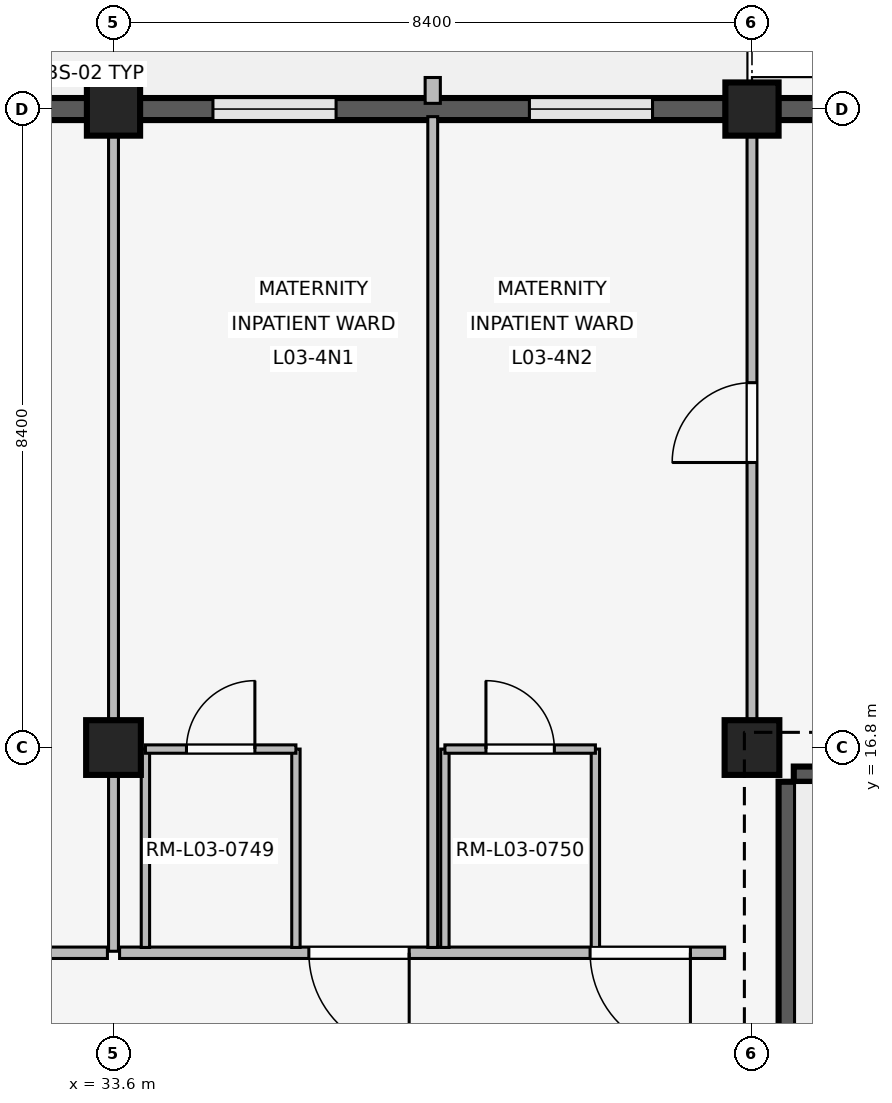
"""IFC4 building model, lengths in metres.
Left out: names, types, materials, properties, quantities, classifications, styles, units other than length and angle.
Written with IfcOpenShell. Run it as: python <this file> out.ifc"""

import sys

from ifc_helpers import new_model, si_unit, direction, frame, frame_2d, origin, origin_2d, place, context, subcontext, project, spatial, rectangle, extrude, element, fill, save


model = new_model("IFC4")
c1 = context("Model", 3, precision=1e-05, world=origin(), true_north=direction((0.0, 1.0)))
c2 = subcontext(c1, "Body", "Model", "MODEL_VIEW")
j1 = project(units=[si_unit("LENGTHUNIT", "METRE"), si_unit("PLANEANGLEUNIT", "RADIAN")], contexts=[c1])
p1 = place(None, origin())
s1 = spatial("IfcSite", under=j1, at=p1, CompositionType="ELEMENT")
p2 = place(p1, origin())
s2 = spatial("IfcBuilding", under=s1, at=p2, CompositionType="ELEMENT")
p3 = place(p2, frame((0.0, 0.0, 12.9)))
s3 = spatial("IfcBuildingStorey", under=s2, at=p3, CompositionType="ELEMENT", Elevation=12.9)
p4 = place(p3, frame((33.6, 16.8, 0.0), z_axis=(0.0, 0.0, 1.0), x_axis=(1.0, 0.0, 0.0)))
e1 = element("IfcColumn", 1, at=p4, inside=s3, PredefinedType="COLUMN", context=c2, shape_type="SweptSolid", body=[
    extrude(rectangle(XDim=0.72, YDim=0.72, at=origin_2d()), origin(), (0.0, 0.0, 1.0), 3.3),
])
p5 = place(p3, frame((33.6, 25.2, 0.0), z_axis=(0.0, 0.0, 1.0), x_axis=(1.0, 0.0, 0.0)))
e2 = element("IfcColumn", 2, at=p5, inside=s3, PredefinedType="COLUMN", context=c2, shape_type="SweptSolid", body=[
    extrude(rectangle(XDim=0.7, YDim=0.7, at=origin_2d()), origin(), (0.0, 0.0, 1.0), 3.3),
])
p6 = place(p3, frame((42.0, 16.8, 0.0), z_axis=(0.0, 0.0, 1.0), x_axis=(1.0, 0.0, 0.0)))
e3 = element("IfcColumn", 3, at=p6, inside=s3, PredefinedType="COLUMN", context=c2, shape_type="SweptSolid", body=[
    extrude(rectangle(XDim=0.72, YDim=0.72, at=origin_2d()), origin(), (0.0, 0.0, 1.0), 3.3),
])
p7 = place(p3, frame((42.0, 25.2, 0.0), z_axis=(0.0, 0.0, 1.0), x_axis=(1.0, 0.0, 0.0)))
e4 = element("IfcColumn", 4, at=p7, inside=s3, PredefinedType="COLUMN", context=c2, shape_type="SweptSolid", body=[
    extrude(rectangle(XDim=0.7, YDim=0.7, at=origin_2d()), origin(), (0.0, 0.0, 1.0), 3.3),
])
p8 = place(p3, frame((25.545, 25.2, 0.0), z_axis=(0.0, 0.0, 1.0), x_axis=(1.0, 0.0, 0.0)))
e5 = element("IfcWall", 5, at=p8, inside=s3, PredefinedType="SOLIDWALL", context=c2, shape_type="SweptSolid", body=[
    extrude(rectangle(XDim=7.71, YDim=0.29, at=frame_2d((3.855, 0.0))), origin(), (0.0, 0.0, 1.0), 2.44),
])
p9 = place(p8, frame((1.2, 0.0, 1.05)))
e6 = element("IfcOpeningElement", 6, at=p9, cuts=e5, PredefinedType="OPENING", context=c2, shape_type="SweptSolid", body=[
    extrude(rectangle(XDim=1.3, YDim=0.75, at=frame_2d((0.65, 0.375))), frame((0.0, 0.155, 0.0), z_axis=(0.0, -1.0, 0.0), x_axis=(1.0, 0.0, 0.0)), (0.0, 0.0, 1.0), 0.31),
])
p10 = place(p8, frame((5.21, 0.0, 1.05)))
e7 = element("IfcOpeningElement", 7, at=p10, cuts=e5, PredefinedType="OPENING", context=c2, shape_type="SweptSolid", body=[
    extrude(rectangle(XDim=1.3, YDim=0.75, at=frame_2d((0.65, 0.375))), frame((0.0, 0.155, 0.0), z_axis=(0.0, -1.0, 0.0), x_axis=(1.0, 0.0, 0.0)), (0.0, 0.0, 1.0), 0.31),
])
p11 = place(p3, frame((33.945, 25.2, 0.0), z_axis=(0.0, 0.0, 1.0), x_axis=(1.0, 0.0, 0.0)))
e8 = element("IfcWall", 8, at=p11, inside=s3, PredefinedType="SOLIDWALL", context=c2, shape_type="SweptSolid", body=[
    extrude(rectangle(XDim=7.71, YDim=0.29, at=frame_2d((3.855, 0.0))), origin(), (0.0, 0.0, 1.0), 2.44),
])
p12 = place(p11, frame((0.963, 0.0, 0.85)))
e9 = element("IfcOpeningElement", 9, at=p12, cuts=e8, PredefinedType="OPENING", context=c2, shape_type="SweptSolid", body=[
    extrude(rectangle(XDim=1.62, YDim=0.95, at=frame_2d((0.81, 0.475))), frame((0.0, 0.155, 0.0), z_axis=(0.0, -1.0, 0.0), x_axis=(1.0, 0.0, 0.0)), (0.0, 0.0, 1.0), 0.31),
])
p13 = place(p11, frame((5.127, 0.0, 0.85)))
e10 = element("IfcOpeningElement", 10, at=p13, cuts=e8, PredefinedType="OPENING", context=c2, shape_type="SweptSolid", body=[
    extrude(rectangle(XDim=1.62, YDim=0.95, at=frame_2d((0.81, 0.475))), frame((0.0, 0.155, 0.0), z_axis=(0.0, -1.0, 0.0), x_axis=(1.0, 0.0, 0.0)), (0.0, 0.0, 1.0), 0.31),
])
p14 = place(p3, frame((37.8, 25.275, 0.0), z_axis=(0.0, 0.0, 1.0), x_axis=(0.0, 1.0, 0.0)))
e11 = element("IfcWall", 11, at=p14, inside=s3, PredefinedType="ELEMENTEDWALL", context=c2, shape_type="SweptSolid", body=[
    extrude(rectangle(XDim=0.34, YDim=0.2, at=frame_2d((0.17, 0.0))), origin(), (0.0, 0.0, 1.0), 2.42),
])
p15 = place(p3, frame((42.345, 25.2, 0.0), z_axis=(0.0, 0.0, 1.0), x_axis=(1.0, 0.0, 0.0)))
e12 = element("IfcWall", 12, at=p15, inside=s3, PredefinedType="SOLIDWALL", context=c2, shape_type="SweptSolid", body=[
    extrude(rectangle(XDim=7.71, YDim=0.29, at=frame_2d((3.855, 0.0))), origin(), (0.0, 0.0, 1.0), 2.44),
])
p16 = place(p15, frame((1.043, 0.0, 0.85)))
e13 = element("IfcOpeningElement", 13, at=p16, cuts=e12, PredefinedType="OPENING", context=c2, shape_type="SweptSolid", body=[
    extrude(rectangle(XDim=1.46, YDim=0.85, at=frame_2d((0.73, 0.425))), frame((0.0, 0.155, 0.0), z_axis=(0.0, -1.0, 0.0), x_axis=(1.0, 0.0, 0.0)), (0.0, 0.0, 1.0), 0.31),
])
p17 = place(p15, frame((5.207, 0.0, 0.85)))
e14 = element("IfcOpeningElement", 14, at=p17, cuts=e12, PredefinedType="OPENING", context=c2, shape_type="SweptSolid", body=[
    extrude(rectangle(XDim=1.46, YDim=0.85, at=frame_2d((0.73, 0.425))), frame((0.0, 0.155, 0.0), z_axis=(0.0, -1.0, 0.0), x_axis=(1.0, 0.0, 0.0)), (0.0, 0.0, 1.0), 0.31),
])
p18 = place(p3, frame((42.55, 16.35, 0.0), z_axis=(0.0, 0.0, 1.0), x_axis=(1.0, 0.0, 0.0)))
e15 = element("IfcWall", 15, at=p18, inside=s3, PredefinedType="SHEAR", context=c2, shape_type="SweptSolid", body=[
    extrude(rectangle(XDim=7.5, YDim=0.4, at=frame_2d((3.75, 0.0))), origin(), (0.0, 0.0, 1.0), 3.02),
])
p19 = place(p3, frame((42.55, 8.8, 0.0), z_axis=(0.0, 0.0, 1.0), x_axis=(0.0, 1.0, 0.0)))
e16 = element("IfcWall", 16, at=p19, inside=s3, PredefinedType="SHEAR", context=c2, shape_type="SweptSolid", body=[
    extrude(rectangle(XDim=7.55, YDim=0.4, at=frame_2d((3.775, 0.0))), origin(), (0.0, 0.0, 1.0), 3.02),
])
p20 = place(p19, frame((0.28, 0.0, 0.0)))
e17 = element("IfcOpeningElement", 17, at=p20, cuts=e16, PredefinedType="OPENING", context=c2, shape_type="SweptSolid", body=[
    extrude(rectangle(XDim=1.0, YDim=2.15, at=frame_2d((0.5, 1.075))), frame((0.0, 0.21, 0.0), z_axis=(0.0, -1.0, 0.0), x_axis=(1.0, 0.0, 0.0)), (0.0, 0.0, 1.0), 0.42),
])
p21 = place(p3, frame((33.52, 14.1, 0.0), z_axis=(0.0, 0.0, 1.0), x_axis=(-1.0, 0.0, 0.0)))
e18 = element("IfcWall", 18, at=p21, inside=s3, PredefinedType="PARTITIONING", context=c2, shape_type="SweptSolid", body=[
    extrude(rectangle(XDim=8.24, YDim=0.15, at=frame_2d((4.12, 0.0))), origin(), (0.0, 0.0, 1.0), 2.42),
])
p22 = place(p21, frame((3.495, 0.0, 0.0)))
e19 = element("IfcOpeningElement", 19, at=p22, cuts=e18, PredefinedType="OPENING", context=c2, shape_type="SweptSolid", body=[
    extrude(rectangle(XDim=1.25, YDim=2.2, at=frame_2d((0.625, 1.1))), frame((0.0, 0.085, 0.0), z_axis=(0.0, -1.0, 0.0), x_axis=(1.0, 0.0, 0.0)), (0.0, 0.0, 1.0), 0.17),
])
p23 = place(p3, frame((33.6, 14.12, 0.0), z_axis=(0.0, 0.0, 1.0), x_axis=(0.0, 1.0, 0.0)))
e20 = element("IfcWall", 20, at=p23, inside=s3, PredefinedType="PARTITIONING", context=c2, shape_type="SweptSolid", body=[
    extrude(rectangle(XDim=10.94, YDim=0.13, at=frame_2d((5.47, 0.0))), origin(), (0.0, 0.0, 1.0), 2.42),
])
p24 = place(p3, frame((41.64, 14.1, 0.0), z_axis=(0.0, 0.0, 1.0), x_axis=(-1.0, 0.0, 0.0)))
e21 = element("IfcWall", 21, at=p24, inside=s3, PredefinedType="PARTITIONING", context=c2, shape_type="SweptSolid", body=[
    extrude(rectangle(XDim=7.96, YDim=0.15, at=frame_2d((3.98, 0.0))), origin(), (0.0, 0.0, 1.0), 2.42),
])
p25 = place(p24, frame((0.45, 0.0, 0.0)))
e22 = element("IfcOpeningElement", 22, at=p25, cuts=e21, PredefinedType="OPENING", context=c2, shape_type="SweptSolid", body=[
    extrude(rectangle(XDim=1.32, YDim=2.25, at=frame_2d((0.66, 1.125))), frame((0.0, 0.085, 0.0), z_axis=(0.0, -1.0, 0.0), x_axis=(1.0, 0.0, 0.0)), (0.0, 0.0, 1.0), 0.17),
])
p26 = place(p24, frame((4.15, 0.0, 0.0)))
e23 = element("IfcOpeningElement", 23, at=p26, cuts=e21, PredefinedType="OPENING", context=c2, shape_type="SweptSolid", body=[
    extrude(rectangle(XDim=1.32, YDim=2.25, at=frame_2d((0.66, 1.125))), frame((0.0, 0.085, 0.0), z_axis=(0.0, -1.0, 0.0), x_axis=(1.0, 0.0, 0.0)), (0.0, 0.0, 1.0), 0.17),
])
p27 = place(p3, frame((37.8, 14.17, 0.0), z_axis=(0.0, 0.0, 1.0), x_axis=(0.0, 1.0, 0.0)))
e24 = element("IfcWall", 24, at=p27, inside=s3, PredefinedType="PARTITIONING", context=c2, shape_type="SweptSolid", body=[
    extrude(rectangle(XDim=10.93, YDim=0.13, at=frame_2d((5.465, 0.0))), origin(), (0.0, 0.0, 1.0), 2.42),
])
for number, where, z_axis, x_axis in (
    (25, (34.02, 14.17, 0.0), (0.0, 0.0, 1.0), (0.0, 1.0, 0.0)),
    (26, (36.0, 14.17, 0.0), (0.0, 0.0, 1.0), (0.0, 1.0, 0.0)),
):
    element("IfcWall", number, at=place(p3, frame(where, z_axis=z_axis, x_axis=x_axis)), inside=s3, PredefinedType="PARTITIONING", context=c2, shape_type="SweptSolid", body=[
        extrude(rectangle(XDim=2.61, YDim=0.11, at=frame_2d((1.305, 0.0))), origin(), (0.0, 0.0, 1.0), 2.42),
    ])
p28 = place(p3, frame((34.02, 16.78, 0.0), z_axis=(0.0, 0.0, 1.0), x_axis=(1.0, 0.0, 0.0)))
e27 = element("IfcWall", 27, at=p28, inside=s3, PredefinedType="PARTITIONING", context=c2, shape_type="SweptSolid", body=[
    extrude(rectangle(XDim=1.98, YDim=0.11, at=frame_2d((0.99, 0.0))), origin(), (0.0, 0.0, 1.0), 2.42),
])
p29 = place(p28, frame((0.54, 0.0, 0.0)))
e28 = element("IfcOpeningElement", 28, at=p29, cuts=e27, PredefinedType="OPENING", context=c2, shape_type="SweptSolid", body=[
    extrude(rectangle(XDim=0.9, YDim=2.1, at=frame_2d((0.45, 1.05))), frame((0.0, 0.065, 0.0), z_axis=(0.0, -1.0, 0.0), x_axis=(1.0, 0.0, 0.0)), (0.0, 0.0, 1.0), 0.13),
])
for number, where, z_axis, x_axis in (
    (29, (37.96, 14.17, 0.0), (0.0, 0.0, 1.0), (0.0, 1.0, 0.0)),
    (30, (39.94, 14.17, 0.0), (0.0, 0.0, 1.0), (0.0, 1.0, 0.0)),
):
    element("IfcWall", number, at=place(p3, frame(where, z_axis=z_axis, x_axis=x_axis)), inside=s3, PredefinedType="PARTITIONING", context=c2, shape_type="SweptSolid", body=[
        extrude(rectangle(XDim=2.61, YDim=0.11, at=frame_2d((1.305, 0.0))), origin(), (0.0, 0.0, 1.0), 2.42),
    ])
p30 = place(p3, frame((37.96, 16.78, 0.0), z_axis=(0.0, 0.0, 1.0), x_axis=(1.0, 0.0, 0.0)))
e31 = element("IfcWall", 31, at=p30, inside=s3, PredefinedType="PARTITIONING", context=c2, shape_type="SweptSolid", body=[
    extrude(rectangle(XDim=1.98, YDim=0.11, at=frame_2d((0.99, 0.0))), origin(), (0.0, 0.0, 1.0), 2.42),
])
p31 = place(p30, frame((0.54, 0.0, 0.0)))
e32 = element("IfcOpeningElement", 32, at=p31, cuts=e31, PredefinedType="OPENING", context=c2, shape_type="SweptSolid", body=[
    extrude(rectangle(XDim=0.9, YDim=2.1, at=frame_2d((0.45, 1.05))), frame((0.0, 0.065, 0.0), z_axis=(0.0, -1.0, 0.0), x_axis=(1.0, 0.0, 0.0)), (0.0, 0.0, 1.0), 0.13),
])
p32 = place(p3, frame((42.0, 17.15, 0.0), z_axis=(0.0, 0.0, 1.0), x_axis=(0.0, 1.0, 0.0)))
e33 = element("IfcWall", 33, at=p32, inside=s3, PredefinedType="PARTITIONING", context=c2, shape_type="SweptSolid", body=[
    extrude(rectangle(XDim=7.91, YDim=0.13, at=frame_2d((3.955, 0.0))), origin(), (0.0, 0.0, 1.0), 2.42),
])
p33 = place(p32, frame((3.4, 0.0, 0.0)))
e34 = element("IfcOpeningElement", 34, at=p33, cuts=e33, PredefinedType="OPENING", context=c2, shape_type="SweptSolid", body=[
    extrude(rectangle(XDim=1.05, YDim=2.2, at=frame_2d((0.525, 1.1))), frame((0.0, 0.075, 0.0), z_axis=(0.0, -1.0, 0.0), x_axis=(1.0, 0.0, 0.0)), (0.0, 0.0, 1.0), 0.15),
])
p34 = place(p12, origin())
e35 = element("IfcWindow", 35, at=p34, inside=s3, PartitioningType="SINGLE_PANEL", PredefinedType="WINDOW", context=c2, shape_type="SweptSolid", body=[
    extrude(rectangle(XDim=1.62, YDim=0.95, at=frame_2d((0.81, 0.475))), frame((0.0, 0.03, 0.0), z_axis=(0.0, -1.0, 0.0), x_axis=(1.0, 0.0, 0.0)), (0.0, 0.0, 1.0), 0.06),
])
fill(e9, e35)
p35 = place(p13, origin())
e36 = element("IfcWindow", 36, at=p35, inside=s3, PartitioningType="SINGLE_PANEL", PredefinedType="WINDOW", context=c2, shape_type="SweptSolid", body=[
    extrude(rectangle(XDim=1.62, YDim=0.95, at=frame_2d((0.81, 0.475))), frame((0.0, 0.03, 0.0), z_axis=(0.0, -1.0, 0.0), x_axis=(1.0, 0.0, 0.0)), (0.0, 0.0, 1.0), 0.06),
])
fill(e10, e36)
p36 = place(p25, origin())
e37 = element("IfcDoor", 37, at=p36, inside=s3, OperationType="SINGLE_SWING_LEFT", PredefinedType="DOOR", context=c2, shape_type="SweptSolid", body=[
    extrude(rectangle(XDim=1.32, YDim=2.25, at=frame_2d((0.66, 1.125))), frame((0.0, 0.025, 0.0), z_axis=(0.0, -1.0, 0.0), x_axis=(1.0, 0.0, 0.0)), (0.0, 0.0, 1.0), 0.05),
])
fill(e22, e37)
p37 = place(p26, origin())
e38 = element("IfcDoor", 38, at=p37, inside=s3, OperationType="SINGLE_SWING_LEFT", PredefinedType="DOOR", context=c2, shape_type="SweptSolid", body=[
    extrude(rectangle(XDim=1.32, YDim=2.25, at=frame_2d((0.66, 1.125))), frame((0.0, 0.025, 0.0), z_axis=(0.0, -1.0, 0.0), x_axis=(1.0, 0.0, 0.0)), (0.0, 0.0, 1.0), 0.05),
])
fill(e23, e38)
p38 = place(p29, origin())
e39 = element("IfcDoor", 39, at=p38, inside=s3, OperationType="SINGLE_SWING_RIGHT", PredefinedType="DOOR", context=c2, shape_type="SweptSolid", body=[
    extrude(rectangle(XDim=0.9, YDim=2.1, at=frame_2d((0.45, 1.05))), frame((0.0, 0.025, 0.0), z_axis=(0.0, -1.0, 0.0), x_axis=(1.0, 0.0, 0.0)), (0.0, 0.0, 1.0), 0.05),
])
fill(e28, e39)
p39 = place(p31, origin())
e40 = element("IfcDoor", 40, at=p39, inside=s3, OperationType="SINGLE_SWING_LEFT", PredefinedType="DOOR", context=c2, shape_type="SweptSolid", body=[
    extrude(rectangle(XDim=0.9, YDim=2.1, at=frame_2d((0.45, 1.05))), frame((0.0, 0.025, 0.0), z_axis=(0.0, -1.0, 0.0), x_axis=(1.0, 0.0, 0.0)), (0.0, 0.0, 1.0), 0.05),
])
fill(e32, e40)
p40 = place(p33, origin())
e41 = element("IfcDoor", 41, at=p40, inside=s3, OperationType="SINGLE_SWING_LEFT", PredefinedType="DOOR", context=c2, shape_type="SweptSolid", body=[
    extrude(rectangle(XDim=1.05, YDim=2.2, at=frame_2d((0.525, 1.1))), frame((0.0, 0.025, 0.0), z_axis=(0.0, -1.0, 0.0), x_axis=(1.0, 0.0, 0.0)), (0.0, 0.0, 1.0), 0.05),
])
fill(e34, e41)
save(model, sys.argv[1])
